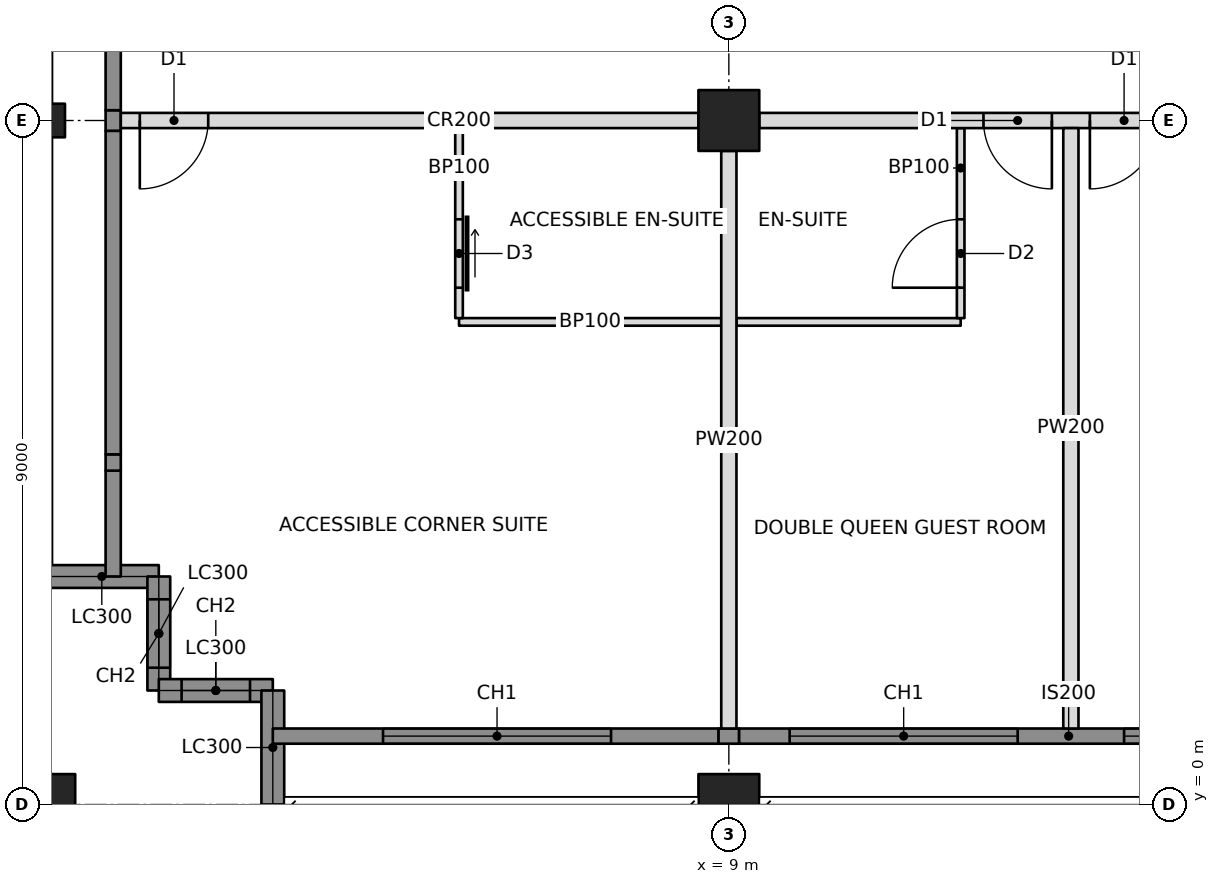
"""IFC4 building model, lengths in metres.
Left out: names, types, materials, properties, quantities, classifications, styles, units other than length and angle.
Written with IfcOpenShell. Run it as: python <this file> out.ifc"""

import sys

from ifc_helpers import new_model, si_unit, direction, frame, frame_2d, origin, origin_with_axes, origin_2d, place, context, subcontext, project, spatial, rectangle, hollow_rectangle, i_section, extrude, element, fill, save


model = new_model("IFC4")
c1 = context("Model", 3, precision=1e-05, world=origin(), true_north=direction((0.0, 1.0)))
c2 = subcontext(c1, "Body", "Model", "MODEL_VIEW")
j1 = project(units=[si_unit("LENGTHUNIT", "METRE"), si_unit("PLANEANGLEUNIT", "RADIAN")], contexts=[c1])
p1 = place(None, origin())
s1 = spatial("IfcSite", under=j1, at=p1, CompositionType="ELEMENT")
p2 = place(p1, origin())
s2 = spatial("IfcBuilding", under=s1, at=p2, CompositionType="ELEMENT")
p3 = place(p2, frame((0.0, 0.0, 124.8)))
s3 = spatial("IfcBuildingStorey", under=s2, at=p3, CompositionType="ELEMENT", Elevation=124.8)
p4 = place(p3, origin_with_axes())
e1 = element("IfcColumn", 1, at=p4, inside=s3, PredefinedType="COLUMN", context=c2, shape_type="SweptSolid", body=[
    extrude(hollow_rectangle(XDim=0.8, YDim=0.8, WallThickness=0.06, at=origin_2d()), origin(), (0.0, 0.0, 1.0), 3.4),
])
p5 = place(p3, frame((0.0, 9.0, 0.0), z_axis=(0.0, 0.0, 1.0), x_axis=(0.0, 1.0, 0.0)))
e2 = element("IfcColumn", 2, at=p5, inside=s3, PredefinedType="COLUMN", context=c2, shape_type="SweptSolid", body=[
    extrude(i_section(OverallWidth=0.442, OverallDepth=0.531, WebThickness=0.066, FlangeThickness=0.106, at=origin_2d()), origin(), (0.0, 0.0, 1.0), 3.4),
])
p6 = place(p3, frame((9.0, 0.0, 0.0), z_axis=(0.0, 0.0, 1.0), x_axis=(1.0, 0.0, 0.0)))
e3 = element("IfcColumn", 3, at=p6, inside=s3, PredefinedType="COLUMN", context=c2, shape_type="SweptSolid", body=[
    extrude(hollow_rectangle(XDim=0.8, YDim=0.8, WallThickness=0.06, at=origin_2d()), origin(), (0.0, 0.0, 1.0), 3.4),
])
p7 = place(p3, frame((9.0, 9.0, 0.0), z_axis=(0.0, 0.0, 1.0), x_axis=(1.0, 0.0, 0.0)))
e4 = element("IfcColumn", 4, at=p7, inside=s3, PredefinedType="COLUMN", context=c2, shape_type="SweptSolid", body=[
    extrude(hollow_rectangle(XDim=0.8, YDim=0.8, WallThickness=0.07, at=origin_2d()), origin(), (0.0, 0.0, 1.0), 3.4),
])
p8 = place(p3, frame((0.0, 3.0, 0.0), z_axis=(0.0, 0.0, 1.0), x_axis=(1.0, 0.0, 0.0)))
e5 = element("IfcWall", 5, at=p8, inside=s3, PredefinedType="SOLIDWALL", context=c2, shape_type="SweptSolid", body=[
    extrude(rectangle(XDim=1.5, YDim=0.3, at=frame_2d((0.75, 0.0))), origin(), (0.0, 0.0, 1.0), 2.42),
])
p9 = place(p3, frame((1.5, 3.0, 0.0), z_axis=(0.0, 0.0, 1.0), x_axis=(0.0, -1.0, 0.0)))
e6 = element("IfcWall", 6, at=p9, inside=s3, PredefinedType="SOLIDWALL", context=c2, shape_type="SweptSolid", body=[
    extrude(rectangle(XDim=1.5, YDim=0.3, at=frame_2d((0.75, 0.0))), origin(), (0.0, 0.0, 1.0), 3.2),
])
p10 = place(p9, frame((0.3, 0.0, 0.6)))
e7 = element("IfcOpeningElement", 7, at=p10, cuts=e6, PredefinedType="OPENING", context=c2, shape_type="SweptSolid", body=[
    extrude(rectangle(XDim=0.9, YDim=2.2, at=frame_2d((0.45, 1.1))), frame((0.0, 0.16, 0.0), z_axis=(0.0, -1.0, 0.0), x_axis=(1.0, 0.0, 0.0)), (0.0, 0.0, 1.0), 0.32),
])
p11 = place(p3, frame((1.5, 1.5, 0.0), z_axis=(0.0, 0.0, 1.0), x_axis=(1.0, 0.0, 0.0)))
e8 = element("IfcWall", 8, at=p11, inside=s3, PredefinedType="SOLIDWALL", context=c2, shape_type="SweptSolid", body=[
    extrude(rectangle(XDim=1.5, YDim=0.3, at=frame_2d((0.75, 0.0))), origin(), (0.0, 0.0, 1.0), 3.2),
])
p12 = place(p11, frame((0.3, 0.0, 0.6)))
e9 = element("IfcOpeningElement", 9, at=p12, cuts=e8, PredefinedType="OPENING", context=c2, shape_type="SweptSolid", body=[
    extrude(rectangle(XDim=0.9, YDim=2.2, at=frame_2d((0.45, 1.1))), frame((0.0, 0.16, 0.0), z_axis=(0.0, -1.0, 0.0), x_axis=(1.0, 0.0, 0.0)), (0.0, 0.0, 1.0), 0.32),
])
p13 = place(p3, frame((3.0, 1.5, 0.0), z_axis=(0.0, 0.0, 1.0), x_axis=(0.0, -1.0, 0.0)))
e10 = element("IfcWall", 10, at=p13, inside=s3, PredefinedType="SOLIDWALL", context=c2, shape_type="SweptSolid", body=[
    extrude(rectangle(XDim=1.5, YDim=0.3, at=frame_2d((0.75, 0.0))), origin(), (0.0, 0.0, 1.0), 2.42),
])
p14 = place(p3, frame((3.0, 0.9, 0.0), z_axis=(0.0, 0.0, 1.0), x_axis=(1.0, 0.0, 0.0)))
e11 = element("IfcWall", 11, at=p14, inside=s3, PredefinedType="SOLIDWALL", context=c2, shape_type="SweptSolid", body=[
    extrude(rectangle(XDim=5.865, YDim=0.2, at=frame_2d((2.932, 0.0))), origin(), (0.0, 0.0, 1.0), 3.2),
])
p15 = place(p14, frame((1.45, 0.0, 0.6)))
e12 = element("IfcOpeningElement", 12, at=p15, cuts=e11, PredefinedType="OPENING", context=c2, shape_type="SweptSolid", body=[
    extrude(rectangle(XDim=3.0, YDim=2.2, at=frame_2d((1.5, 1.1))), frame((0.0, 0.11, 0.0), z_axis=(0.0, -1.0, 0.0), x_axis=(1.0, 0.0, 0.0)), (0.0, 0.0, 1.0), 0.22),
])
p16 = place(p3, frame((0.9, 3.0, 0.0), z_axis=(0.0, 0.0, 1.0), x_axis=(0.0, 1.0, 0.0)))
e13 = element("IfcWall", 13, at=p16, inside=s3, PredefinedType="SOLIDWALL", context=c2, shape_type="SweptSolid", body=[
    extrude(rectangle(XDim=1.393, YDim=0.2, at=frame_2d((0.696, 0.0))), origin(), (0.0, 0.0, 1.0), 3.2),
])
p17 = place(p3, frame((1.0, 9.0, 0.0), z_axis=(0.0, 0.0, 1.0), x_axis=(1.0, 0.0, 0.0)))
e14 = element("IfcWall", 14, at=p17, inside=s3, PredefinedType="PARTITIONING", context=c2, shape_type="SweptSolid", body=[
    extrude(rectangle(XDim=7.6, YDim=0.2, at=frame_2d((3.8, 0.0))), origin(), (0.0, 0.0, 1.0), 2.438),
])
p18 = place(p17, frame((0.25, 0.0, 0.0)))
e15 = element("IfcOpeningElement", 15, at=p18, cuts=e14, PredefinedType="OPENING", context=c2, shape_type="SweptSolid", body=[
    extrude(rectangle(XDim=0.9, YDim=2.1, at=frame_2d((0.45, 1.05))), frame((0.0, 0.11, 0.0), z_axis=(0.0, -1.0, 0.0), x_axis=(1.0, 0.0, 0.0)), (0.0, 0.0, 1.0), 0.22),
])
p19 = place(p3, frame((9.4, 9.0, 0.0), z_axis=(0.0, 0.0, 1.0), x_axis=(1.0, 0.0, 0.0)))
e16 = element("IfcWall", 16, at=p19, inside=s3, PredefinedType="PARTITIONING", context=c2, shape_type="SweptSolid", body=[
    extrude(rectangle(XDim=8.2, YDim=0.2, at=frame_2d((4.1, 0.0))), origin(), (0.0, 0.0, 1.0), 2.405),
])
p20 = place(p19, frame((2.95, 0.0, 0.0)))
e17 = element("IfcOpeningElement", 17, at=p20, cuts=e16, PredefinedType="OPENING", context=c2, shape_type="SweptSolid", body=[
    extrude(rectangle(XDim=0.9, YDim=2.1, at=frame_2d((0.45, 1.05))), frame((0.0, 0.11, 0.0), z_axis=(0.0, -1.0, 0.0), x_axis=(1.0, 0.0, 0.0)), (0.0, 0.0, 1.0), 0.22),
])
p21 = place(p19, frame((4.35, 0.0, 0.0)))
e18 = element("IfcOpeningElement", 18, at=p21, cuts=e16, PredefinedType="OPENING", context=c2, shape_type="SweptSolid", body=[
    extrude(rectangle(XDim=0.9, YDim=2.1, at=frame_2d((0.45, 1.05))), frame((0.0, 0.11, 0.0), z_axis=(0.0, -1.0, 0.0), x_axis=(1.0, 0.0, 0.0)), (0.0, 0.0, 1.0), 0.22),
])
p22 = place(p3, frame((9.0, 8.6, 0.0), z_axis=(0.0, 0.0, 1.0), x_axis=(0.0, -1.0, 0.0)))
e19 = element("IfcWall", 19, at=p22, inside=s3, PredefinedType="PARTITIONING", context=c2, shape_type="SweptSolid", body=[
    extrude(rectangle(XDim=7.6, YDim=0.2, at=frame_2d((3.8, 0.0))), origin(), (0.0, 0.0, 1.0), 2.438),
])
p23 = place(p3, frame((13.5, 8.9, 0.0), z_axis=(0.0, 0.0, 1.0), x_axis=(0.0, -1.0, 0.0)))
e20 = element("IfcWall", 20, at=p23, inside=s3, PredefinedType="PARTITIONING", context=c2, shape_type="SweptSolid", body=[
    extrude(rectangle(XDim=7.9, YDim=0.2, at=frame_2d((3.95, 0.0))), origin(), (0.0, 0.0, 1.0), 2.404),
])
p24 = place(p3, frame((5.45, 6.35, 0.0), z_axis=(0.0, 0.0, 1.0), x_axis=(1.0, 0.0, 0.0)))
e21 = element("IfcWall", 21, at=p24, inside=s3, PredefinedType="PARTITIONING", context=c2, shape_type="SweptSolid", body=[
    extrude(rectangle(XDim=3.45, YDim=0.1, at=frame_2d((1.725, 0.0))), origin(), (0.0, 0.0, 1.0), 2.438),
])
p25 = place(p3, frame((5.45, 8.9, 0.0), z_axis=(0.0, 0.0, 1.0), x_axis=(0.0, -1.0, 0.0)))
e22 = element("IfcWall", 22, at=p25, inside=s3, PredefinedType="PARTITIONING", context=c2, shape_type="SweptSolid", body=[
    extrude(rectangle(XDim=2.5, YDim=0.1, at=frame_2d((1.25, 0.0))), origin(), (0.0, 0.0, 1.0), 2.438),
])
p26 = place(p25, frame((1.2, 0.0, 0.0)))
e23 = element("IfcOpeningElement", 23, at=p26, cuts=e22, PredefinedType="OPENING", context=c2, shape_type="SweptSolid", body=[
    extrude(rectangle(XDim=0.9, YDim=2.1, at=frame_2d((0.45, 1.05))), frame((0.0, 0.06, 0.0), z_axis=(0.0, -1.0, 0.0), x_axis=(1.0, 0.0, 0.0)), (0.0, 0.0, 1.0), 0.12),
])
p27 = place(p3, frame((9.1, 6.35, 0.0), z_axis=(0.0, 0.0, 1.0), x_axis=(1.0, 0.0, 0.0)))
e24 = element("IfcWall", 24, at=p27, inside=s3, PredefinedType="PARTITIONING", context=c2, shape_type="SweptSolid", body=[
    extrude(rectangle(XDim=2.95, YDim=0.1, at=frame_2d((1.475, 0.0))), origin(), (0.0, 0.0, 1.0), 2.438),
])
p28 = place(p3, frame((12.05, 8.9, 0.0), z_axis=(0.0, 0.0, 1.0), x_axis=(0.0, -1.0, 0.0)))
e25 = element("IfcWall", 25, at=p28, inside=s3, PredefinedType="PARTITIONING", context=c2, shape_type="SweptSolid", body=[
    extrude(rectangle(XDim=2.5, YDim=0.1, at=frame_2d((1.25, 0.0))), origin(), (0.0, 0.0, 1.0), 2.404),
])
p29 = place(p28, frame((1.2, 0.0, 0.0)))
e26 = element("IfcOpeningElement", 26, at=p29, cuts=e25, PredefinedType="OPENING", context=c2, shape_type="SweptSolid", body=[
    extrude(rectangle(XDim=0.9, YDim=2.1, at=frame_2d((0.45, 1.05))), frame((0.0, 0.06, 0.0), z_axis=(0.0, -1.0, 0.0), x_axis=(1.0, 0.0, 0.0)), (0.0, 0.0, 1.0), 0.12),
])
p30 = place(p3, frame((8.865, 0.9, 0.0), z_axis=(0.0, 0.0, 1.0), x_axis=(1.0, 0.0, 0.0)))
e27 = element("IfcWall", 27, at=p30, inside=s3, PredefinedType="SOLIDWALL", context=c2, shape_type="SweptSolid", body=[
    extrude(rectangle(XDim=0.271, YDim=0.2, at=frame_2d((0.135, 0.0))), origin(), (0.0, 0.0, 1.0), 2.438),
])
p31 = place(p3, frame((9.135, 0.9, 0.0), z_axis=(0.0, 0.0, 1.0), x_axis=(1.0, 0.0, 0.0)))
e28 = element("IfcWall", 28, at=p31, inside=s3, PredefinedType="SOLIDWALL", context=c2, shape_type="SweptSolid", body=[
    extrude(rectangle(XDim=8.671, YDim=0.2, at=frame_2d((4.335, 0.0))), origin(), (0.0, 0.0, 1.0), 3.2),
])
p32 = place(p31, frame((0.665, 0.0, 0.6)))
e29 = element("IfcOpeningElement", 29, at=p32, cuts=e28, PredefinedType="OPENING", context=c2, shape_type="SweptSolid", body=[
    extrude(rectangle(XDim=3.0, YDim=2.2, at=frame_2d((1.5, 1.1))), frame((0.0, 0.11, 0.0), z_axis=(0.0, -1.0, 0.0), x_axis=(1.0, 0.0, 0.0)), (0.0, 0.0, 1.0), 0.22),
])
p33 = place(p31, frame((5.065, 0.0, 0.6)))
e30 = element("IfcOpeningElement", 30, at=p33, cuts=e28, PredefinedType="OPENING", context=c2, shape_type="SweptSolid", body=[
    extrude(rectangle(XDim=3.0, YDim=2.2, at=frame_2d((1.5, 1.1))), frame((0.0, 0.11, 0.0), z_axis=(0.0, -1.0, 0.0), x_axis=(1.0, 0.0, 0.0)), (0.0, 0.0, 1.0), 0.22),
])
p34 = place(p3, frame((0.9, 4.393, 0.0), z_axis=(0.0, 0.0, 1.0), x_axis=(0.0, 1.0, 0.0)))
e31 = element("IfcWall", 31, at=p34, inside=s3, PredefinedType="SOLIDWALL", context=c2, shape_type="SweptSolid", body=[
    extrude(rectangle(XDim=0.215, YDim=0.2, at=frame_2d((0.107, 0.0))), origin(), (0.0, 0.0, 1.0), 2.661),
])
p35 = place(p3, frame((0.9, 4.607, 0.0), z_axis=(0.0, 0.0, 1.0), x_axis=(0.0, 1.0, 0.0)))
e32 = element("IfcWall", 32, at=p35, inside=s3, PredefinedType="SOLIDWALL", context=c2, shape_type="SweptSolid", body=[
    extrude(rectangle(XDim=4.257, YDim=0.2, at=frame_2d((2.129, 0.0))), origin(), (0.0, 0.0, 1.0), 3.2),
])
p36 = place(p3, frame((0.9, 8.865, 0.0), z_axis=(0.0, 0.0, 1.0), x_axis=(0.0, 1.0, 0.0)))
e33 = element("IfcWall", 33, at=p36, inside=s3, PredefinedType="SOLIDWALL", context=c2, shape_type="SweptSolid", body=[
    extrude(rectangle(XDim=0.271, YDim=0.2, at=frame_2d((0.135, 0.0))), origin(), (0.0, 0.0, 1.0), 2.438),
])
p37 = place(p3, frame((0.9, 9.135, 0.0), z_axis=(0.0, 0.0, 1.0), x_axis=(0.0, 1.0, 0.0)))
e34 = element("IfcWall", 34, at=p37, inside=s3, PredefinedType="SOLIDWALL", context=c2, shape_type="SweptSolid", body=[
    extrude(rectangle(XDim=8.671, YDim=0.2, at=frame_2d((4.335, 0.0))), origin(), (0.0, 0.0, 1.0), 3.2),
])
p38 = place(p37, frame((2.015, 0.0, 0.6)))
e35 = element("IfcOpeningElement", 35, at=p38, cuts=e34, PredefinedType="OPENING", context=c2, shape_type="SweptSolid", body=[
    extrude(rectangle(XDim=3.0, YDim=2.2, at=frame_2d((1.5, 1.1))), frame((0.0, 0.11, 0.0), z_axis=(0.0, -1.0, 0.0), x_axis=(1.0, 0.0, 0.0)), (0.0, 0.0, 1.0), 0.22),
])
p39 = place(p37, frame((5.515, 0.0, 0.6)))
e36 = element("IfcOpeningElement", 36, at=p39, cuts=e34, PredefinedType="OPENING", context=c2, shape_type="SweptSolid", body=[
    extrude(rectangle(XDim=3.0, YDim=2.2, at=frame_2d((1.5, 1.1))), frame((0.0, 0.11, 0.0), z_axis=(0.0, -1.0, 0.0), x_axis=(1.0, 0.0, 0.0)), (0.0, 0.0, 1.0), 0.22),
])
p40 = place(p10, origin())
e37 = element("IfcWindow", 37, at=p40, inside=s3, PartitioningType="SINGLE_PANEL", PredefinedType="WINDOW", context=c2, shape_type="SweptSolid", body=[
    extrude(rectangle(XDim=0.9, YDim=2.2, at=frame_2d((0.45, 1.1))), frame((0.0, 0.03, 0.0), z_axis=(0.0, -1.0, 0.0), x_axis=(1.0, 0.0, 0.0)), (0.0, 0.0, 1.0), 0.06),
])
fill(e7, e37)
p41 = place(p12, origin())
e38 = element("IfcWindow", 38, at=p41, inside=s3, PartitioningType="SINGLE_PANEL", PredefinedType="WINDOW", context=c2, shape_type="SweptSolid", body=[
    extrude(rectangle(XDim=0.9, YDim=2.2, at=frame_2d((0.45, 1.1))), frame((0.0, 0.03, 0.0), z_axis=(0.0, -1.0, 0.0), x_axis=(1.0, 0.0, 0.0)), (0.0, 0.0, 1.0), 0.06),
])
fill(e9, e38)
p42 = place(p15, origin())
e39 = element("IfcWindow", 39, at=p42, inside=s3, PartitioningType="TRIPLE_PANEL_VERTICAL", PredefinedType="WINDOW", context=c2, shape_type="SweptSolid", body=[
    extrude(rectangle(XDim=3.0, YDim=2.2, at=frame_2d((1.5, 1.1))), frame((0.0, 0.03, 0.0), z_axis=(0.0, -1.0, 0.0), x_axis=(1.0, 0.0, 0.0)), (0.0, 0.0, 1.0), 0.06),
])
fill(e12, e39)
p43 = place(p32, origin())
e40 = element("IfcWindow", 40, at=p43, inside=s3, PartitioningType="TRIPLE_PANEL_VERTICAL", PredefinedType="WINDOW", context=c2, shape_type="SweptSolid", body=[
    extrude(rectangle(XDim=3.0, YDim=2.2, at=frame_2d((1.5, 1.1))), frame((0.0, 0.03, 0.0), z_axis=(0.0, -1.0, 0.0), x_axis=(1.0, 0.0, 0.0)), (0.0, 0.0, 1.0), 0.06),
])
fill(e29, e40)
p44 = place(p33, origin())
e41 = element("IfcWindow", 41, at=p44, inside=s3, PartitioningType="TRIPLE_PANEL_VERTICAL", PredefinedType="WINDOW", context=c2, shape_type="SweptSolid", body=[
    extrude(rectangle(XDim=3.0, YDim=2.2, at=frame_2d((1.5, 1.1))), frame((0.0, 0.03, 0.0), z_axis=(0.0, -1.0, 0.0), x_axis=(1.0, 0.0, 0.0)), (0.0, 0.0, 1.0), 0.06),
])
fill(e30, e41)
p45 = place(p26, origin())
e42 = element("IfcDoor", 42, at=p45, inside=s3, OperationType="SLIDING_TO_LEFT", PredefinedType="DOOR", context=c2, shape_type="SweptSolid", body=[
    extrude(rectangle(XDim=0.9, YDim=2.1, at=frame_2d((0.45, 1.05))), frame((0.0, 0.025, 0.0), z_axis=(0.0, -1.0, 0.0), x_axis=(1.0, 0.0, 0.0)), (0.0, 0.0, 1.0), 0.05),
])
fill(e23, e42)
p46 = place(p18, frame((0.9, 0.0, 0.0), z_axis=(0.0, 0.0, 1.0), x_axis=(-1.0, 0.0, 0.0)))
e43 = element("IfcDoor", 43, at=p46, inside=s3, OperationType="SINGLE_SWING_RIGHT", PredefinedType="DOOR", context=c2, shape_type="SweptSolid", body=[
    extrude(rectangle(XDim=0.9, YDim=2.1, at=frame_2d((0.45, 1.05))), frame((0.0, 0.025, 0.0), z_axis=(0.0, -1.0, 0.0), x_axis=(1.0, 0.0, 0.0)), (0.0, 0.0, 1.0), 0.05),
])
fill(e15, e43)
p47 = place(p29, frame((0.9, 0.0, 0.0), z_axis=(0.0, 0.0, 1.0), x_axis=(-1.0, 0.0, 0.0)))
e44 = element("IfcDoor", 44, at=p47, inside=s3, OperationType="SINGLE_SWING_LEFT", PredefinedType="DOOR", context=c2, shape_type="SweptSolid", body=[
    extrude(rectangle(XDim=0.9, YDim=2.1, at=frame_2d((0.45, 1.05))), frame((0.0, 0.025, 0.0), z_axis=(0.0, -1.0, 0.0), x_axis=(1.0, 0.0, 0.0)), (0.0, 0.0, 1.0), 0.05),
])
fill(e26, e44)
p48 = place(p20, frame((0.9, 0.0, 0.0), z_axis=(0.0, 0.0, 1.0), x_axis=(-1.0, 0.0, 0.0)))
e45 = element("IfcDoor", 45, at=p48, inside=s3, OperationType="SINGLE_SWING_LEFT", PredefinedType="DOOR", context=c2, shape_type="SweptSolid", body=[
    extrude(rectangle(XDim=0.9, YDim=2.1, at=frame_2d((0.45, 1.05))), frame((0.0, 0.025, 0.0), z_axis=(0.0, -1.0, 0.0), x_axis=(1.0, 0.0, 0.0)), (0.0, 0.0, 1.0), 0.05),
])
fill(e17, e45)
p49 = place(p21, frame((0.9, 0.0, 0.0), z_axis=(0.0, 0.0, 1.0), x_axis=(-1.0, 0.0, 0.0)))
e46 = element("IfcDoor", 46, at=p49, inside=s3, OperationType="SINGLE_SWING_RIGHT", PredefinedType="DOOR", context=c2, shape_type="SweptSolid", body=[
    extrude(rectangle(XDim=0.9, YDim=2.1, at=frame_2d((0.45, 1.05))), frame((0.0, 0.025, 0.0), z_axis=(0.0, -1.0, 0.0), x_axis=(1.0, 0.0, 0.0)), (0.0, 0.0, 1.0), 0.05),
])
fill(e18, e46)
save(model, sys.argv[1])
